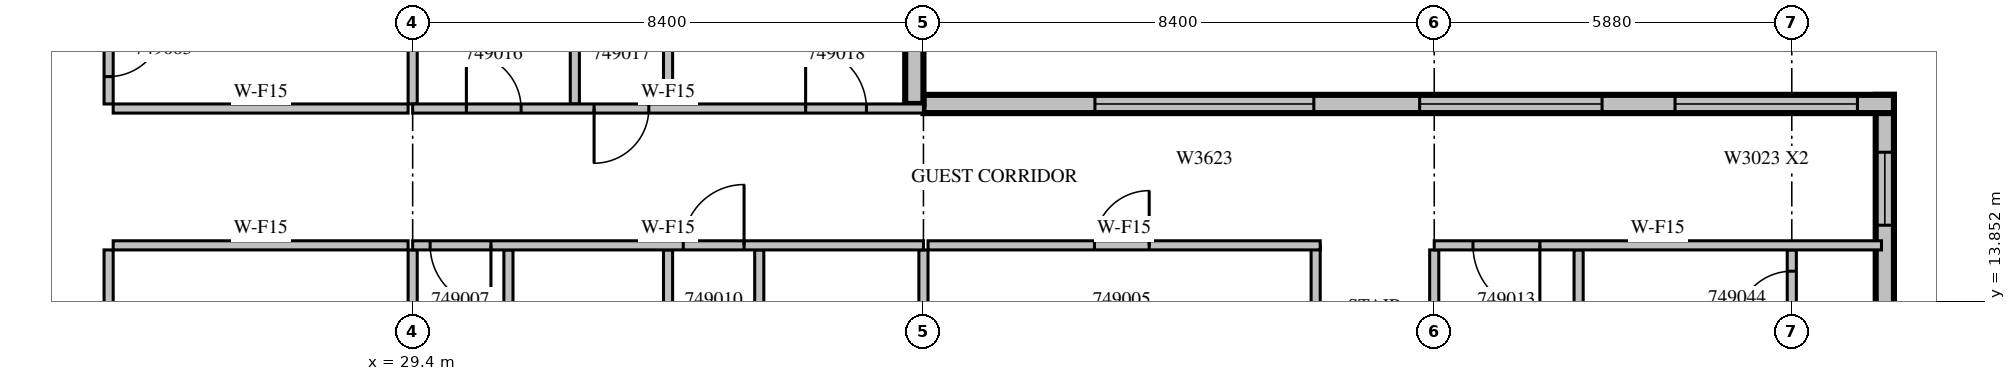
"""IFC4 building model, lengths in metres.
Left out: names, types, materials, properties, quantities, classifications, styles, units other than length and angle.
Written with IfcOpenShell. Run it as: python <this file> out.ifc"""

import sys

from ifc_helpers import new_model, si_unit, direction, frame, frame_2d, origin, place, context, subcontext, project, spatial, rectangle, extrude, source, transform, mapped, element, fill, save


model = new_model("IFC4")
c1 = context("Model", 3, precision=1e-05, world=origin(), true_north=direction((0.0, 1.0)))
c2 = subcontext(c1, "Body", "Model", "MODEL_VIEW")
j1 = project(units=[si_unit("LENGTHUNIT", "METRE"), si_unit("PLANEANGLEUNIT", "RADIAN")], contexts=[c1])
p1 = place(None, origin())
s1 = spatial("IfcSite", under=j1, at=p1, CompositionType="ELEMENT")
p2 = place(p1, origin())
s2 = spatial("IfcBuilding", under=s1, at=p2, CompositionType="ELEMENT")
p3 = place(p2, frame((0.0, 0.0, 219.6)))
s3 = spatial("IfcBuildingStorey", under=s2, at=p3, CompositionType="ELEMENT", Elevation=219.6)
m1 = source(origin(), c2, "Body", "SweptSolid", [
    extrude(rectangle(XDim=6.75, YDim=0.3, at=frame_2d((3.375, 0.0))), origin(), (0.0, 0.0, 1.0), 3.4),
])
p4 = place(p3, frame((53.61, 10.5, 0.0), z_axis=(0.0, 0.0, 1.0), x_axis=(0.0, 1.0, 0.0)))
e1 = element("IfcWall", 1, at=p4, inside=s3, PredefinedType="STANDARD", context=c2, shape_type="MappedRepresentation", body=[
    mapped(m1, transform((0.0, 0.0, 0.0), scale=1.0)),
])
m2 = source(origin(), c2, "Body", "SweptSolid", [
    extrude(rectangle(XDim=1.2, YDim=2.3, at=frame_2d((0.6, 1.15))), frame((0.0, 0.16, 0.0), z_axis=(0.0, -1.0, 0.0), x_axis=(1.0, 0.0, 0.0)), (0.0, 0.0, 1.0), 0.32),
])
p5 = place(p4, frame((1.087, 0.0, 0.6)))
e2 = element("IfcOpeningElement", 2, at=p5, cuts=e1, PredefinedType="OPENING", context=c2, shape_type="MappedRepresentation", body=[
    mapped(m2, transform((0.0, 0.0, 0.0), scale=1.0)),
])
p6 = place(p4, frame((4.606, 0.0, 0.6)))
e3 = element("IfcOpeningElement", 3, at=p6, cuts=e1, PredefinedType="OPENING", context=c2, shape_type="MappedRepresentation", body=[
    mapped(m2, transform((0.0, 0.0, 0.0), scale=1.0)),
])
m3 = source(origin(), c2, "Body", "SweptSolid", [
    extrude(rectangle(XDim=15.96, YDim=0.3, at=frame_2d((7.98, 0.0))), origin(), (0.0, 0.0, 1.0), 3.4),
])
p7 = place(p3, frame((53.76, 17.1, 0.0), z_axis=(0.0, 0.0, 1.0), x_axis=(-1.0, 0.0, 0.0)))
e4 = element("IfcWall", 4, at=p7, inside=s3, PredefinedType="STANDARD", context=c2, shape_type="MappedRepresentation", body=[
    mapped(m3, transform((0.0, 0.0, 0.0), scale=1.0)),
])
m4 = source(origin(), c2, "Body", "SweptSolid", [
    extrude(rectangle(XDim=3.0, YDim=2.3, at=frame_2d((1.5, 1.15))), frame((0.0, 0.16, 0.0), z_axis=(0.0, -1.0, 0.0), x_axis=(1.0, 0.0, 0.0)), (0.0, 0.0, 1.0), 0.32),
])
p8 = place(p7, frame((0.6, 0.0, 0.6)))
e5 = element("IfcOpeningElement", 5, at=p8, cuts=e4, PredefinedType="OPENING", context=c2, shape_type="MappedRepresentation", body=[
    mapped(m4, transform((0.0, 0.0, 0.0), scale=1.0)),
])
p9 = place(p7, frame((4.8, 0.0, 0.6)))
e6 = element("IfcOpeningElement", 6, at=p9, cuts=e4, PredefinedType="OPENING", context=c2, shape_type="MappedRepresentation", body=[
    mapped(m4, transform((0.0, 0.0, 0.0), scale=1.0)),
])
m5 = source(origin(), c2, "Body", "SweptSolid", [
    extrude(rectangle(XDim=3.6, YDim=2.3, at=frame_2d((1.8, 1.15))), frame((0.0, 0.16, 0.0), z_axis=(0.0, -1.0, 0.0), x_axis=(1.0, 0.0, 0.0)), (0.0, 0.0, 1.0), 0.32),
])
p10 = place(p7, frame((9.54, 0.0, 0.6)))
e7 = element("IfcOpeningElement", 7, at=p10, cuts=e4, PredefinedType="OPENING", context=c2, shape_type="MappedRepresentation", body=[
    mapped(m5, transform((0.0, 0.0, 0.0), scale=1.0)),
])
m6 = source(origin(), c2, "Body", "SweptSolid", [
    extrude(rectangle(XDim=3.0, YDim=0.3, at=frame_2d((1.5, 0.0))), origin(), (0.0, 0.0, 1.0), 3.4),
])
p11 = place(p3, frame((37.65, 17.1, 0.0), z_axis=(0.0, 0.0, 1.0), x_axis=(0.0, 1.0, 0.0)))
e8 = element("IfcWall", 8, at=p11, inside=s3, PredefinedType="STANDARD", context=c2, shape_type="MappedRepresentation", body=[
    mapped(m6, transform((0.0, 0.0, 0.0), scale=1.0)),
])
p12 = place(p11, frame((1.425, 0.0, 0.6)))
e9 = element("IfcOpeningElement", 9, at=p12, cuts=e8, PredefinedType="OPENING", context=c2, shape_type="MappedRepresentation", body=[
    mapped(m2, transform((0.0, 0.0, 0.0), scale=1.0)),
])
m7 = source(origin(), c2, "Body", "SweptSolid", [
    extrude(rectangle(XDim=11.225, YDim=0.15, at=frame_2d((5.612, 0.0))), origin(), (0.0, 0.0, 1.0), 3.4),
])
p13 = place(p3, frame((24.4, 14.7, 0.0), z_axis=(0.0, 0.0, 1.0), x_axis=(0.0, -1.0, 0.0)))
e10 = element("IfcWall", 10, at=p13, inside=s3, PredefinedType="PARTITIONING", context=c2, shape_type="MappedRepresentation", body=[
    mapped(m7, transform((0.0, 0.0, 0.0), scale=1.0)),
])
m8 = source(origin(), c2, "Body", "SweptSolid", [
    extrude(rectangle(XDim=0.9, YDim=2.1, at=frame_2d((0.45, 1.05))), frame((0.0, 0.085, 0.0), z_axis=(0.0, -1.0, 0.0), x_axis=(1.0, 0.0, 0.0)), (0.0, 0.0, 1.0), 0.17),
])
p14 = place(p13, frame((9.062, 0.0, 0.0)))
e11 = element("IfcOpeningElement", 11, at=p14, cuts=e10, PredefinedType="OPENING", context=c2, shape_type="MappedRepresentation", body=[
    mapped(m8, transform((0.0, 0.0, 0.0), scale=1.0)),
])
p15 = place(p13, frame((2.575, 0.0, 0.0)))
e12 = element("IfcOpeningElement", 12, at=p15, cuts=e10, PredefinedType="OPENING", context=c2, shape_type="MappedRepresentation", body=[
    mapped(m8, transform((0.0, 0.0, 0.0), scale=1.0)),
])
m9 = source(origin(), c2, "Body", "SweptSolid", [
    extrude(rectangle(XDim=3.6, YDim=0.15, at=frame_2d((1.8, 0.0))), origin(), (0.0, 0.0, 1.0), 3.4),
])
p16 = place(p3, frame((24.4, 20.7, 0.0), z_axis=(0.0, 0.0, 1.0), x_axis=(0.0, -1.0, 0.0)))
e13 = element("IfcWall", 13, at=p16, inside=s3, PredefinedType="PARTITIONING", context=c2, shape_type="MappedRepresentation", body=[
    mapped(m9, transform((0.0, 0.0, 0.0), scale=1.0)),
])
p17 = place(p16, frame((2.25, 0.0, 0.0)))
e14 = element("IfcOpeningElement", 14, at=p17, cuts=e13, PredefinedType="OPENING", context=c2, shape_type="MappedRepresentation", body=[
    mapped(m8, transform((0.0, 0.0, 0.0), scale=1.0)),
])
m10 = source(origin(), c2, "Body", "SweptSolid", [
    extrude(rectangle(XDim=4.85, YDim=0.15, at=frame_2d((2.425, 0.0))), origin(), (0.0, 0.0, 1.0), 3.4),
])
for number, where, z_axis, x_axis in (
    (15, (29.325, 14.775, 0.0), (0.0, 0.0, 1.0), (-1.0, 0.0, 0.0)),
    (16, (24.475, 17.025, 0.0), (0.0, 0.0, 1.0), (1.0, 0.0, 0.0)),
):
    element("IfcWall", number, at=place(p3, frame(where, z_axis=z_axis, x_axis=x_axis)), inside=s3, PredefinedType="PARTITIONING", context=c2, shape_type="MappedRepresentation", body=[
        mapped(m10, transform((0.0, 0.0, 0.0), scale=1.0)),
    ])
m11 = source(origin(), c2, "Body", "SweptSolid", [
    extrude(rectangle(XDim=3.751, YDim=0.15, at=frame_2d((1.875, 0.0))), origin(), (0.0, 0.0, 1.0), 3.4),
])
p18 = place(p3, frame((29.4, 10.949, 0.0), z_axis=(0.0, 0.0, 1.0), x_axis=(0.0, 1.0, 0.0)))
e17 = element("IfcWall", 17, at=p18, inside=s3, PredefinedType="PARTITIONING", context=c2, shape_type="MappedRepresentation", body=[
    mapped(m11, transform((0.0, 0.0, 0.0), scale=1.0)),
])
m12 = source(origin(), c2, "Body", "SweptSolid", [
    extrude(rectangle(XDim=3.001, YDim=0.15, at=frame_2d((1.5, 0.0))), origin(), (0.0, 0.0, 1.0), 3.4),
])
p19 = place(p3, frame((29.4, 17.1, 0.0), z_axis=(0.0, 0.0, 1.0), x_axis=(0.0, 1.0, 0.0)))
e18 = element("IfcWall", 18, at=p19, inside=s3, PredefinedType="PARTITIONING", context=c2, shape_type="MappedRepresentation", body=[
    mapped(m12, transform((0.0, 0.0, 0.0), scale=1.0)),
])
m13 = source(origin(), c2, "Body", "SweptSolid", [
    extrude(rectangle(XDim=3.275, YDim=0.15, at=frame_2d((1.637, 0.0))), origin(), (0.0, 0.0, 1.0), 3.4),
])
p20 = place(p3, frame((44.25, 11.5, 0.0), z_axis=(0.0, 0.0, 1.0), x_axis=(0.0, 1.0, 0.0)))
e19 = element("IfcWall", 19, at=p20, inside=s3, PredefinedType="PARTITIONING", context=c2, shape_type="MappedRepresentation", body=[
    mapped(m13, transform((0.0, 0.0, 0.0), scale=1.0)),
])
m14 = source(origin(), c2, "Body", "SweptSolid", [
    extrude(rectangle(XDim=6.45, YDim=0.15, at=frame_2d((3.225, 0.0))), origin(), (0.0, 0.0, 1.0), 3.4),
])
p21 = place(p3, frame((44.325, 14.775, 0.0), z_axis=(0.0, 0.0, 1.0), x_axis=(-1.0, 0.0, 0.0)))
e20 = element("IfcWall", 20, at=p21, inside=s3, PredefinedType="PARTITIONING", context=c2, shape_type="MappedRepresentation", body=[
    mapped(m14, transform((0.0, 0.0, 0.0), scale=1.0)),
])
p22 = place(p21, frame((2.812, 0.0, 0.0)))
e21 = element("IfcOpeningElement", 21, at=p22, cuts=e20, PredefinedType="OPENING", context=c2, shape_type="MappedRepresentation", body=[
    mapped(m8, transform((0.0, 0.0, 0.0), scale=1.0)),
])
for number, where, z_axis, x_axis in (
    (22, (30.975, 11.1, 0.0), (0.0, 0.0, 1.0), (0.0, 1.0, 0.0)),
    (23, (33.6, 11.1, 0.0), (0.0, 0.0, 1.0), (0.0, 1.0, 0.0)),
    (24, (35.1, 11.1, 0.0), (0.0, 0.0, 1.0), (0.0, 1.0, 0.0)),
    (25, (37.8, 11.1, 0.0), (0.0, 0.0, 1.0), (0.0, 1.0, 0.0)),
    (26, (48.574, 11.1, 0.0), (0.0, 0.0, 1.0), (0.0, 1.0, 0.0)),
):
    element("IfcWall", number, at=place(p3, frame(where, z_axis=z_axis, x_axis=x_axis)), inside=s3, PredefinedType="PARTITIONING", context=c2, shape_type="MappedRepresentation", body=[
        mapped(m9, transform((0.0, 0.0, 0.0), scale=1.0)),
    ])
p23 = place(p3, frame((52.08, 11.1, 0.0), z_axis=(0.0, 0.0, 1.0), x_axis=(0.0, 1.0, 0.0)))
e27 = element("IfcWall", 27, at=p23, inside=s3, PredefinedType="PARTITIONING", context=c2, shape_type="MappedRepresentation", body=[
    mapped(m9, transform((0.0, 0.0, 0.0), scale=1.0)),
])
p24 = place(p23, frame((1.35, 0.0, 0.0)))
e28 = element("IfcOpeningElement", 28, at=p24, cuts=e27, PredefinedType="OPENING", context=c2, shape_type="MappedRepresentation", body=[
    mapped(m8, transform((0.0, 0.0, 0.0), scale=1.0)),
])
p25 = place(p23, frame((2.35, 0.0, 0.0)))
e29 = element("IfcOpeningElement", 29, at=p25, cuts=e27, PredefinedType="OPENING", context=c2, shape_type="MappedRepresentation", body=[
    mapped(m8, transform((0.0, 0.0, 0.0), scale=1.0)),
])
p26 = place(p23, frame((0.35, 0.0, 0.0)))
e30 = element("IfcOpeningElement", 30, at=p26, cuts=e27, PredefinedType="OPENING", context=c2, shape_type="MappedRepresentation", body=[
    mapped(m8, transform((0.0, 0.0, 0.0), scale=1.0)),
])
for number, where, z_axis, x_axis in (
    (31, (46.2, 11.1, 0.0), (0.0, 0.0, 1.0), (0.0, 1.0, 0.0)),
    (32, (32.067, 20.7, 0.0), (0.0, 0.0, 1.0), (0.0, -1.0, 0.0)),
    (33, (33.6, 17.1, 0.0), (0.0, 0.0, 1.0), (0.0, 1.0, 0.0)),
):
    element("IfcWall", number, at=place(p3, frame(where, z_axis=z_axis, x_axis=x_axis)), inside=s3, PredefinedType="PARTITIONING", context=c2, shape_type="MappedRepresentation", body=[
        mapped(m9, transform((0.0, 0.0, 0.0), scale=1.0)),
    ])
m15 = source(origin(), c2, "Body", "SweptSolid", [
    extrude(rectangle(XDim=8.4, YDim=0.15, at=frame_2d((4.2, 0.0))), origin(), (0.0, 0.0, 1.0), 3.4),
])
p27 = place(p3, frame((37.8, 14.775, 0.0), z_axis=(0.0, 0.0, 1.0), x_axis=(-1.0, 0.0, 0.0)))
e34 = element("IfcWall", 34, at=p27, inside=s3, PredefinedType="PARTITIONING", context=c2, shape_type="MappedRepresentation", body=[
    mapped(m15, transform((0.0, 0.0, 0.0), scale=1.0)),
])
m16 = source(origin(), c2, "Body", "SweptSolid", [
    extrude(rectangle(XDim=1.0, YDim=2.1, at=frame_2d((0.5, 1.05))), frame((0.0, 0.085, 0.0), z_axis=(0.0, -1.0, 0.0), x_axis=(1.0, 0.0, 0.0)), (0.0, 0.0, 1.0), 0.17),
])
p28 = place(p27, frame((7.112, 0.0, 0.0)))
e35 = element("IfcOpeningElement", 35, at=p28, cuts=e34, PredefinedType="OPENING", context=c2, shape_type="MappedRepresentation", body=[
    mapped(m16, transform((0.0, 0.0, 0.0), scale=1.0)),
])
p29 = place(p27, frame((2.95, 0.0, 0.0)))
e36 = element("IfcOpeningElement", 36, at=p29, cuts=e34, PredefinedType="OPENING", context=c2, shape_type="MappedRepresentation", body=[
    mapped(m16, transform((0.0, 0.0, 0.0), scale=1.0)),
])
m17 = source(origin(), c2, "Body", "SweptSolid", [
    extrude(rectangle(XDim=7.355, YDim=0.15, at=frame_2d((3.678, 0.0))), origin(), (0.0, 0.0, 1.0), 3.4),
])
p30 = place(p3, frame((53.555, 14.775, 0.0), z_axis=(0.0, 0.0, 1.0), x_axis=(-1.0, 0.0, 0.0)))
e37 = element("IfcWall", 37, at=p30, inside=s3, PredefinedType="PARTITIONING", context=c2, shape_type="MappedRepresentation", body=[
    mapped(m17, transform((0.0, 0.0, 0.0), scale=1.0)),
])
m18 = source(origin(), c2, "Body", "SweptSolid", [
    extrude(rectangle(XDim=1.1, YDim=2.1, at=frame_2d((0.55, 1.05))), frame((0.0, 0.085, 0.0), z_axis=(0.0, -1.0, 0.0), x_axis=(1.0, 0.0, 0.0)), (0.0, 0.0, 1.0), 0.17),
])
p31 = place(p30, frame((5.618, 0.0, 0.0)))
e38 = element("IfcOpeningElement", 38, at=p31, cuts=e37, PredefinedType="OPENING", context=c2, shape_type="MappedRepresentation", body=[
    mapped(m18, transform((0.0, 0.0, 0.0), scale=1.0)),
])
p32 = place(p3, frame((29.4, 17.025, 0.0), z_axis=(0.0, 0.0, 1.0), x_axis=(1.0, 0.0, 0.0)))
e39 = element("IfcWall", 39, at=p32, inside=s3, PredefinedType="PARTITIONING", context=c2, shape_type="MappedRepresentation", body=[
    mapped(m15, transform((0.0, 0.0, 0.0), scale=1.0)),
])
p33 = place(p32, frame((0.883, 0.0, 0.0)))
e40 = element("IfcOpeningElement", 40, at=p33, cuts=e39, PredefinedType="OPENING", context=c2, shape_type="MappedRepresentation", body=[
    mapped(m8, transform((0.0, 0.0, 0.0), scale=1.0)),
])
p34 = place(p32, frame((2.983, 0.0, 0.0)))
e41 = element("IfcOpeningElement", 41, at=p34, cuts=e39, PredefinedType="OPENING", context=c2, shape_type="MappedRepresentation", body=[
    mapped(m8, transform((0.0, 0.0, 0.0), scale=1.0)),
])
p35 = place(p32, frame((6.463, 0.0, 0.0)))
e42 = element("IfcOpeningElement", 42, at=p35, cuts=e39, PredefinedType="OPENING", context=c2, shape_type="MappedRepresentation", body=[
    mapped(m16, transform((0.0, 0.0, 0.0), scale=1.0)),
])
m19 = source(origin(), c2, "Body", "SweptSolid", [
    extrude(rectangle(XDim=1.2, YDim=2.3, at=frame_2d((0.6, 1.15))), frame((0.0, 0.03, 0.0), z_axis=(0.0, -1.0, 0.0), x_axis=(1.0, 0.0, 0.0)), (0.0, 0.0, 1.0), 0.06),
])
p36 = place(p6, origin())
e43 = element("IfcWindow", 43, at=p36, inside=s3, PartitioningType="SINGLE_PANEL", PredefinedType="WINDOW", context=c2, shape_type="MappedRepresentation", body=[
    mapped(m19, transform((0.0, 0.0, 0.0), scale=1.0)),
])
fill(e3, e43)
m20 = source(origin(), c2, "Body", "SweptSolid", [
    extrude(rectangle(XDim=3.0, YDim=2.3, at=frame_2d((1.5, 1.15))), frame((0.0, 0.03, 0.0), z_axis=(0.0, -1.0, 0.0), x_axis=(1.0, 0.0, 0.0)), (0.0, 0.0, 1.0), 0.06),
])
p37 = place(p8, origin())
e44 = element("IfcWindow", 44, at=p37, inside=s3, PartitioningType="SINGLE_PANEL", PredefinedType="WINDOW", context=c2, shape_type="MappedRepresentation", body=[
    mapped(m20, transform((0.0, 0.0, 0.0), scale=1.0)),
])
fill(e5, e44)
p38 = place(p9, origin())
e45 = element("IfcWindow", 45, at=p38, inside=s3, PartitioningType="SINGLE_PANEL", PredefinedType="WINDOW", context=c2, shape_type="MappedRepresentation", body=[
    mapped(m20, transform((0.0, 0.0, 0.0), scale=1.0)),
])
fill(e6, e45)
m21 = source(origin(), c2, "Body", "SweptSolid", [
    extrude(rectangle(XDim=3.6, YDim=2.3, at=frame_2d((1.8, 1.15))), frame((0.0, 0.03, 0.0), z_axis=(0.0, -1.0, 0.0), x_axis=(1.0, 0.0, 0.0)), (0.0, 0.0, 1.0), 0.06),
])
p39 = place(p10, origin())
e46 = element("IfcWindow", 46, at=p39, inside=s3, PartitioningType="SINGLE_PANEL", PredefinedType="WINDOW", context=c2, shape_type="MappedRepresentation", body=[
    mapped(m21, transform((0.0, 0.0, 0.0), scale=1.0)),
])
fill(e7, e46)
m22 = source(origin(), c2, "Body", "SweptSolid", [
    extrude(rectangle(XDim=0.9, YDim=2.1, at=frame_2d((0.45, 1.05))), frame((0.0, 0.025, 0.0), z_axis=(0.0, -1.0, 0.0), x_axis=(1.0, 0.0, 0.0)), (0.0, 0.0, 1.0), 0.05),
])
p40 = place(p17, origin())
e47 = element("IfcDoor", 47, at=p40, inside=s3, OperationType="SINGLE_SWING_LEFT", PredefinedType="DOOR", context=c2, shape_type="MappedRepresentation", body=[
    mapped(m22, transform((0.0, 0.0, 0.0), scale=1.0)),
])
fill(e14, e47)
p41 = place(p22, origin())
e48 = element("IfcDoor", 48, at=p41, inside=s3, OperationType="SINGLE_SWING_RIGHT", PredefinedType="DOOR", context=c2, shape_type="MappedRepresentation", body=[
    mapped(m22, transform((0.0, 0.0, 0.0), scale=1.0)),
])
fill(e21, e48)
m23 = source(origin(), c2, "Body", "SweptSolid", [
    extrude(rectangle(XDim=1.0, YDim=2.1, at=frame_2d((0.5, 1.05))), frame((0.0, 0.025, 0.0), z_axis=(0.0, -1.0, 0.0), x_axis=(1.0, 0.0, 0.0)), (0.0, 0.0, 1.0), 0.05),
])
p42 = place(p28, origin())
e49 = element("IfcDoor", 49, at=p42, inside=s3, OperationType="SINGLE_SWING_LEFT", PredefinedType="DOOR", context=c2, shape_type="MappedRepresentation", body=[
    mapped(m23, transform((0.0, 0.0, 0.0), scale=1.0)),
])
fill(e35, e49)
p43 = place(p29, origin())
e50 = element("IfcDoor", 50, at=p43, inside=s3, OperationType="SINGLE_SWING_RIGHT", PredefinedType="DOOR", context=c2, shape_type="MappedRepresentation", body=[
    mapped(m23, transform((0.0, 0.0, 0.0), scale=1.0)),
])
fill(e36, e50)
m24 = source(origin(), c2, "Body", "SweptSolid", [
    extrude(rectangle(XDim=1.1, YDim=2.1, at=frame_2d((0.55, 1.05))), frame((0.0, 0.025, 0.0), z_axis=(0.0, -1.0, 0.0), x_axis=(1.0, 0.0, 0.0)), (0.0, 0.0, 1.0), 0.05),
])
p44 = place(p31, origin())
e51 = element("IfcDoor", 51, at=p44, inside=s3, OperationType="SINGLE_SWING_LEFT", PredefinedType="DOOR", context=c2, shape_type="MappedRepresentation", body=[
    mapped(m24, transform((0.0, 0.0, 0.0), scale=1.0)),
])
fill(e38, e51)
p45 = place(p33, origin())
e52 = element("IfcDoor", 52, at=p45, inside=s3, OperationType="SINGLE_SWING_LEFT", PredefinedType="DOOR", context=c2, shape_type="MappedRepresentation", body=[
    mapped(m22, transform((0.0, 0.0, 0.0), scale=1.0)),
])
fill(e40, e52)
p46 = place(p34, origin())
e53 = element("IfcDoor", 53, at=p46, inside=s3, OperationType="SINGLE_SWING_RIGHT", PredefinedType="DOOR", context=c2, shape_type="MappedRepresentation", body=[
    mapped(m22, transform((0.0, 0.0, 0.0), scale=1.0)),
])
fill(e41, e53)
p47 = place(p35, origin())
e54 = element("IfcDoor", 54, at=p47, inside=s3, OperationType="SINGLE_SWING_LEFT", PredefinedType="DOOR", context=c2, shape_type="MappedRepresentation", body=[
    mapped(m23, transform((0.0, 0.0, 0.0), scale=1.0)),
])
fill(e42, e54)
p48 = place(p25, origin())
e55 = element("IfcDoor", 55, at=p48, inside=s3, OperationType="SINGLE_SWING_LEFT", PredefinedType="DOOR", context=c2, shape_type="MappedRepresentation", body=[
    mapped(m22, transform((0.0, 0.0, 0.0), scale=1.0)),
])
fill(e29, e55)
save(model, sys.argv[1])
